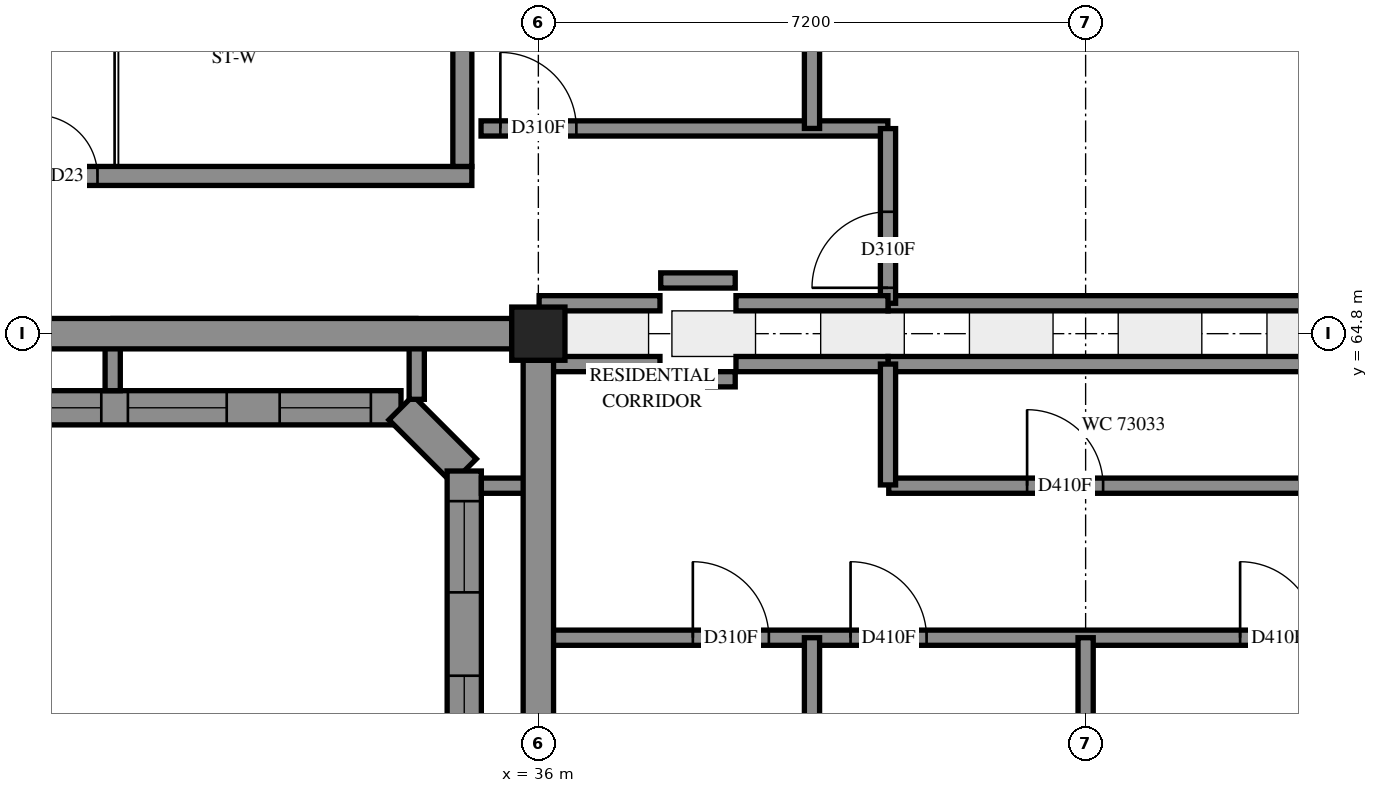
"""IFC4 building model, lengths in metres.
Left out: names, types, materials, properties, quantities, classifications, styles, units other than length and angle.
Written with IfcOpenShell. Run it as: python <this file> out.ifc"""

import sys

from ifc_helpers import new_model, si_unit, direction, frame, frame_2d, origin, origin_2d, place, context, subcontext, project, spatial, polyline, rectangle, outline, extrude, element, fill, save


model = new_model("IFC4")
c1 = context("Model", 3, precision=1e-05, world=origin(), true_north=direction((0.0, 1.0)))
c2 = subcontext(c1, "Body", "Model", "MODEL_VIEW")
j1 = project(units=[si_unit("LENGTHUNIT", "METRE"), si_unit("PLANEANGLEUNIT", "RADIAN")], contexts=[c1])
p1 = place(None, origin())
s1 = spatial("IfcSite", under=j1, at=p1, CompositionType="ELEMENT")
p2 = place(p1, origin())
s2 = spatial("IfcBuilding", under=s1, at=p2, CompositionType="ELEMENT")
p3 = place(p2, frame((0.0, 0.0, 267.6)))
s3 = spatial("IfcBuildingStorey", under=s2, at=p3, CompositionType="ELEMENT", Elevation=267.6)
p4 = place(p3, frame((36.0, 64.8, 0.0), z_axis=(0.0, 0.0, 1.0), x_axis=(1.0, 0.0, 0.0)))
e1 = element("IfcColumn", 1, at=p4, inside=s3, PredefinedType="COLUMN", context=c2, shape_type="SweptSolid", body=[
    extrude(rectangle(XDim=0.7, YDim=0.7, at=origin_2d()), origin(), (0.0, 0.0, 1.0), 3.1),
])
p5 = place(p3, frame((26.713, 63.825, 0.0), z_axis=(0.0, 0.0, 1.0), x_axis=(1.0, 0.0, 0.0)))
e2 = element("IfcWall", 2, at=p5, inside=s3, PredefinedType="SOLIDWALL", context=c2, shape_type="SweptSolid", body=[
    extrude(outline(polyline([(-0.225, -0.225), (7.387, -0.225), (7.573, 0.225), (0.225, 0.225), (-0.225, -0.225)])), origin(), (0.0, 0.0, 1.0), 3.1),
])
p6 = place(p5, frame((0.656, 0.0, 0.45)))
e3 = element("IfcOpeningElement", 3, at=p6, cuts=e2, PredefinedType="OPENING", context=c2, shape_type="SweptSolid", body=[
    extrude(rectangle(XDim=1.2, YDim=2.55, at=frame_2d((0.6, 1.275))), frame((0.0, 0.235, 0.0), z_axis=(0.0, -1.0, 0.0), x_axis=(1.0, 0.0, 0.0)), (0.0, 0.0, 1.0), 0.47),
])
p7 = place(p5, frame((5.884, 0.0, 0.45)))
e4 = element("IfcOpeningElement", 4, at=p7, cuts=e2, PredefinedType="OPENING", context=c2, shape_type="SweptSolid", body=[
    extrude(rectangle(XDim=1.2, YDim=2.55, at=frame_2d((0.6, 1.275))), frame((0.0, 0.235, 0.0), z_axis=(0.0, -1.0, 0.0), x_axis=(1.0, 0.0, 0.0)), (0.0, 0.0, 1.0), 0.47),
])
p8 = place(p5, frame((2.537, 0.0, 0.45)))
e5 = element("IfcOpeningElement", 5, at=p8, cuts=e2, PredefinedType="OPENING", context=c2, shape_type="SweptSolid", body=[
    extrude(rectangle(XDim=1.0, YDim=2.5, at=frame_2d((0.5, 1.25))), frame((0.0, 0.235, 0.0), z_axis=(0.0, -1.0, 0.0), x_axis=(1.0, 0.0, 0.0)), (0.0, 0.0, 1.0), 0.47),
])
p9 = place(p5, frame((3.887, 0.0, 0.45)))
e6 = element("IfcOpeningElement", 6, at=p9, cuts=e2, PredefinedType="OPENING", context=c2, shape_type="SweptSolid", body=[
    extrude(rectangle(XDim=1.3, YDim=2.5, at=frame_2d((0.65, 1.25))), frame((0.0, 0.235, 0.0), z_axis=(0.0, -1.0, 0.0), x_axis=(1.0, 0.0, 0.0)), (0.0, 0.0, 1.0), 0.47),
])
p10 = place(p3, frame((34.193, 63.825, 0.0), z_axis=(0.0, 0.0, 1.0), x_axis=(0.7071067812, -0.7071067812, 0.0)))
e7 = element("IfcWall", 7, at=p10, inside=s3, PredefinedType="SOLIDWALL", context=c2, shape_type="SweptSolid", body=[
    extrude(outline(polyline([(0.093, -0.225), (1.083, -0.225), (1.27, 0.225), (-0.093, 0.225), (0.093, -0.225)])), origin(), (0.0, 0.0, 1.0), 3.1),
])
p11 = place(p3, frame((35.025, 62.993, 0.0), z_axis=(0.0, 0.0, 1.0), x_axis=(0.0, -1.0, 0.0)))
e8 = element("IfcWall", 8, at=p11, inside=s3, PredefinedType="SOLIDWALL", context=c2, shape_type="SweptSolid", body=[
    extrude(outline(polyline([(0.093, -0.225), (6.593, -0.225), (6.143, 0.225), (-0.093, 0.225), (0.093, -0.225)])), origin(), (0.0, 0.0, 1.0), 3.1),
])
p12 = place(p11, frame((0.397, 0.0, 0.45)))
e9 = element("IfcOpeningElement", 9, at=p12, cuts=e8, PredefinedType="OPENING", context=c2, shape_type="SweptSolid", body=[
    extrude(rectangle(XDim=1.2, YDim=2.55, at=frame_2d((0.6, 1.275))), frame((0.0, 0.235, 0.0), z_axis=(0.0, -1.0, 0.0), x_axis=(1.0, 0.0, 0.0)), (0.0, 0.0, 1.0), 0.47),
])
p13 = place(p11, frame((2.693, 0.0, 0.7)))
e10 = element("IfcOpeningElement", 10, at=p13, cuts=e8, PredefinedType="OPENING", context=c2, shape_type="SweptSolid", body=[
    extrude(rectangle(XDim=1.8, YDim=2.3, at=frame_2d((0.9, 1.15))), frame((0.0, 0.235, 0.0), z_axis=(0.0, -1.0, 0.0), x_axis=(1.0, 0.0, 0.0)), (0.0, 0.0, 1.0), 0.47),
])
p14 = place(p3, frame((28.875, 66.875, -0.3), z_axis=(0.0, 0.0, 1.0), x_axis=(1.0, 0.0, 0.0)))
e11 = element("IfcWall", 11, at=p14, inside=s3, PredefinedType="SOLIDWALL", context=c2, shape_type="SweptSolid", body=[
    extrude(rectangle(XDim=6.25, YDim=0.25, at=frame_2d((3.125, 0.0))), origin(), (0.0, 0.0, 1.0), 3.4),
])
p15 = place(p14, frame((0.525, 0.0, 0.3)))
e12 = element("IfcOpeningElement", 12, at=p15, cuts=e11, PredefinedType="OPENING", context=c2, shape_type="SweptSolid", body=[
    extrude(rectangle(XDim=0.8, YDim=2.1, at=frame_2d((0.4, 1.05))), frame((0.0, 0.135, 0.0), z_axis=(0.0, -1.0, 0.0), x_axis=(1.0, 0.0, 0.0)), (0.0, 0.0, 1.0), 0.27),
])
p16 = place(p3, frame((35.0, 67.0, -0.3), z_axis=(0.0, 0.0, 1.0), x_axis=(0.0, 1.0, 0.0)))
e13 = element("IfcWall", 13, at=p16, inside=s3, PredefinedType="SOLIDWALL", context=c2, shape_type="SweptSolid", body=[
    extrude(rectangle(XDim=2.85, YDim=0.25, at=frame_2d((1.425, 0.0))), origin(), (0.0, 0.0, 1.0), 3.4),
])
p17 = place(p3, frame((36.0, 60.8, 0.0), z_axis=(0.0, 0.0, 1.0), x_axis=(1.0, 0.0, 0.0)))
e14 = element("IfcWall", 14, at=p17, inside=s3, PredefinedType="PARTITIONING", context=c2, shape_type="SweptSolid", body=[
    extrude(rectangle(XDim=17.0, YDim=0.2, at=frame_2d((8.5, 0.0))), origin(), (0.0, 0.0, 1.0), 3.1),
])
p18 = place(p17, frame((2.033, 0.0, 0.0)))
e15 = element("IfcOpeningElement", 15, at=p18, cuts=e14, PredefinedType="OPENING", context=c2, shape_type="SweptSolid", body=[
    extrude(rectangle(XDim=1.0, YDim=2.1, at=frame_2d((0.5, 1.05))), frame((0.0, 0.11, 0.0), z_axis=(0.0, -1.0, 0.0), x_axis=(1.0, 0.0, 0.0)), (0.0, 0.0, 1.0), 0.22),
])
p19 = place(p17, frame((4.107, 0.0, 0.0)))
e16 = element("IfcOpeningElement", 16, at=p19, cuts=e14, PredefinedType="OPENING", context=c2, shape_type="SweptSolid", body=[
    extrude(rectangle(XDim=1.0, YDim=2.1, at=frame_2d((0.5, 1.05))), frame((0.0, 0.11, 0.0), z_axis=(0.0, -1.0, 0.0), x_axis=(1.0, 0.0, 0.0)), (0.0, 0.0, 1.0), 0.22),
])
p20 = place(p17, frame((9.232, 0.0, 0.0)))
e17 = element("IfcOpeningElement", 17, at=p20, cuts=e14, PredefinedType="OPENING", context=c2, shape_type="SweptSolid", body=[
    extrude(rectangle(XDim=1.0, YDim=2.1, at=frame_2d((0.5, 1.05))), frame((0.0, 0.11, 0.0), z_axis=(0.0, -1.0, 0.0), x_axis=(1.0, 0.0, 0.0)), (0.0, 0.0, 1.0), 0.22),
])
p21 = place(p17, frame((11.307, 0.0, 0.0)))
e18 = element("IfcOpeningElement", 18, at=p21, cuts=e14, PredefinedType="OPENING", context=c2, shape_type="SweptSolid", body=[
    extrude(rectangle(XDim=1.0, YDim=2.1, at=frame_2d((0.5, 1.05))), frame((0.0, 0.11, 0.0), z_axis=(0.0, -1.0, 0.0), x_axis=(1.0, 0.0, 0.0)), (0.0, 0.0, 1.0), 0.22),
])
p22 = place(p17, frame((15.874, 0.0, 0.0)))
e19 = element("IfcOpeningElement", 19, at=p22, cuts=e14, PredefinedType="OPENING", context=c2, shape_type="SweptSolid", body=[
    extrude(rectangle(XDim=1.0, YDim=2.1, at=frame_2d((0.5, 1.05))), frame((0.0, 0.11, 0.0), z_axis=(0.0, -1.0, 0.0), x_axis=(1.0, 0.0, 0.0)), (0.0, 0.0, 1.0), 0.22),
])
p23 = place(p3, frame((40.61, 62.8, 0.0), z_axis=(0.0, 0.0, 1.0), x_axis=(1.0, 0.0, 0.0)))
e20 = element("IfcWall", 20, at=p23, inside=s3, PredefinedType="PARTITIONING", context=c2, shape_type="SweptSolid", body=[
    extrude(rectangle(XDim=14.59, YDim=0.2, at=frame_2d((7.295, 0.0))), origin(), (0.0, 0.0, 1.0), 3.1),
])
p24 = place(p23, frame((1.82, 0.0, 0.0)))
e21 = element("IfcOpeningElement", 21, at=p24, cuts=e20, PredefinedType="OPENING", context=c2, shape_type="SweptSolid", body=[
    extrude(rectangle(XDim=1.0, YDim=2.1, at=frame_2d((0.5, 1.05))), frame((0.0, 0.11, 0.0), z_axis=(0.0, -1.0, 0.0), x_axis=(1.0, 0.0, 0.0)), (0.0, 0.0, 1.0), 0.22),
])
p25 = place(p23, frame((6.758, 0.0, 0.0)))
e22 = element("IfcOpeningElement", 22, at=p25, cuts=e20, PredefinedType="OPENING", context=c2, shape_type="SweptSolid", body=[
    extrude(rectangle(XDim=1.0, YDim=2.1, at=frame_2d((0.5, 1.05))), frame((0.0, 0.11, 0.0), z_axis=(0.0, -1.0, 0.0), x_axis=(1.0, 0.0, 0.0)), (0.0, 0.0, 1.0), 0.22),
])
p26 = place(p23, frame((10.005, 0.0, 0.0)))
e23 = element("IfcOpeningElement", 23, at=p26, cuts=e20, PredefinedType="OPENING", context=c2, shape_type="SweptSolid", body=[
    extrude(rectangle(XDim=1.0, YDim=2.1, at=frame_2d((0.5, 1.05))), frame((0.0, 0.11, 0.0), z_axis=(0.0, -1.0, 0.0), x_axis=(1.0, 0.0, 0.0)), (0.0, 0.0, 1.0), 0.22),
])
for number, where, z_axis, x_axis in (
    (24, (40.6, 64.4, 0.0), (0.0, 0.0, 1.0), (1.0, 0.0, 0.0)),
    (25, (40.6, 65.2, 0.0), (0.0, 0.0, 1.0), (1.0, 0.0, 0.0)),
):
    element("IfcWall", number, at=place(p3, frame(where, z_axis=z_axis, x_axis=x_axis)), inside=s3, PredefinedType="PARTITIONING", context=c2, shape_type="SweptSolid", body=[
        extrude(rectangle(XDim=9.8, YDim=0.2, at=frame_2d((4.9, 0.0))), origin(), (0.0, 0.0, 1.0), 3.1),
    ])
p27 = place(p3, frame((35.246, 67.5, 0.0), z_axis=(0.0, 0.0, 1.0), x_axis=(1.0, 0.0, 0.0)))
e26 = element("IfcWall", 26, at=p27, inside=s3, PredefinedType="PARTITIONING", context=c2, shape_type="SweptSolid", body=[
    extrude(rectangle(XDim=5.352, YDim=0.2, at=frame_2d((2.676, 0.0))), origin(), (0.0, 0.0, 1.0), 3.1),
])
p28 = place(p27, frame((0.254, 0.0, 0.0)))
e27 = element("IfcOpeningElement", 27, at=p28, cuts=e26, PredefinedType="OPENING", context=c2, shape_type="SweptSolid", body=[
    extrude(rectangle(XDim=1.0, YDim=2.1, at=frame_2d((0.5, 1.05))), frame((0.0, 0.11, 0.0), z_axis=(0.0, -1.0, 0.0), x_axis=(1.0, 0.0, 0.0)), (0.0, 0.0, 1.0), 0.22),
])
p29 = place(p3, frame((39.6, 67.5, 0.0), z_axis=(0.0, 0.0, 1.0), x_axis=(0.0, 1.0, 0.0)))
e28 = element("IfcWall", 28, at=p29, inside=s3, PredefinedType="PARTITIONING", context=c2, shape_type="SweptSolid", body=[
    extrude(rectangle(XDim=4.1, YDim=0.2, at=frame_2d((2.05, 0.0))), origin(), (0.0, 0.0, 1.0), 3.1),
])
p30 = place(p3, frame((30.402, 64.9, 0.0), z_axis=(0.0, 0.0, 1.0), x_axis=(1.0, 0.0, 0.0)))
e29 = element("IfcWall", 29, at=p30, inside=s3, PredefinedType="PARTITIONING", context=c2, shape_type="SweptSolid", body=[
    extrude(rectangle(XDim=3.988, YDim=0.2, at=frame_2d((1.994, 0.0))), origin(), (0.0, 0.0, 1.0), 2.6),
])
p31 = place(p3, frame((36.0, 58.0, 0.0), z_axis=(0.0, 0.0, 1.0), x_axis=(0.0, 1.0, 0.0)))
e30 = element("IfcWall", 30, at=p31, inside=s3, PredefinedType="PARTITIONING", context=c2, shape_type="SweptSolid", body=[
    extrude(rectangle(XDim=2.8, YDim=0.2, at=frame_2d((1.4, 0.0))), origin(), (0.0, 0.0, 1.0), 2.6),
])
for number, where, z_axis, x_axis in (
    (31, (39.6, 58.0, 0.0), (0.0, 0.0, 1.0), (0.0, 1.0, 0.0)),
    (32, (43.2, 58.0, 0.0), (0.0, 0.0, 1.0), (0.0, 1.0, 0.0)),
):
    element("IfcWall", number, at=place(p3, frame(where, z_axis=z_axis, x_axis=x_axis)), inside=s3, PredefinedType="PARTITIONING", context=c2, shape_type="SweptSolid", body=[
        extrude(rectangle(XDim=2.8, YDim=0.2, at=frame_2d((1.4, 0.0))), origin(), (0.0, 0.0, 1.0), 3.1),
    ])
p32 = place(p3, frame((40.6, 65.2, 0.0), z_axis=(0.0, 0.0, 1.0), x_axis=(0.0, 1.0, 0.0)))
e33 = element("IfcWall", 33, at=p32, inside=s3, PredefinedType="PARTITIONING", context=c2, shape_type="SweptSolid", body=[
    extrude(rectangle(XDim=2.298, YDim=0.2, at=frame_2d((1.149, 0.0))), origin(), (0.0, 0.0, 1.0), 3.1),
])
p33 = place(p32, frame((0.203, 0.0, 0.0)))
e34 = element("IfcOpeningElement", 34, at=p33, cuts=e33, PredefinedType="OPENING", context=c2, shape_type="SweptSolid", body=[
    extrude(rectangle(XDim=1.0, YDim=2.1, at=frame_2d((0.5, 1.05))), frame((0.0, 0.11, 0.0), z_axis=(0.0, -1.0, 0.0), x_axis=(1.0, 0.0, 0.0)), (0.0, 0.0, 1.0), 0.22),
])
for number, where, z_axis, x_axis in (
    (35, (38.6, 64.4, 0.0), (0.0, 0.0, 1.0), (1.0, 0.0, 0.0)),
    (36, (38.6, 65.2, 0.0), (0.0, 0.0, 1.0), (1.0, 0.0, 0.0)),
):
    element("IfcWall", number, at=place(p3, frame(where, z_axis=z_axis, x_axis=x_axis)), inside=s3, PredefinedType="PARTITIONING", context=c2, shape_type="SweptSolid", body=[
        extrude(rectangle(XDim=2.0, YDim=0.2, at=frame_2d((1.0, 0.0))), origin(), (0.0, 0.0, 1.0), 3.1),
    ])
p34 = place(p3, frame((36.0, 60.8, 0.0), z_axis=(0.0, 0.0, 1.0), x_axis=(0.0, 1.0, 0.0)))
e37 = element("IfcWall", 37, at=p34, inside=s3, PredefinedType="PARTITIONING", context=c2, shape_type="SweptSolid", body=[
    extrude(rectangle(XDim=1.988, YDim=0.2, at=frame_2d((0.994, 0.0))), origin(), (0.0, 0.0, 1.0), 2.6),
])
for number, where, z_axis, x_axis in (
    (38, (36.01, 64.4, 0.0), (0.0, 0.0, 1.0), (1.0, 0.0, 0.0)),
    (39, (36.01, 65.2, 0.0), (0.0, 0.0, 1.0), (1.0, 0.0, 0.0)),
    (40, (40.6, 62.81, 0.0), (0.0, 0.0, 1.0), (0.0, 1.0, 0.0)),
):
    element("IfcWall", number, at=place(p3, frame(where, z_axis=z_axis, x_axis=x_axis)), inside=s3, PredefinedType="PARTITIONING", context=c2, shape_type="SweptSolid", body=[
        extrude(rectangle(XDim=1.59, YDim=0.2, at=frame_2d((0.795, 0.0))), origin(), (0.0, 0.0, 1.0), 3.1),
    ])
for number, where, z_axis, x_axis in (
    (41, (37.61, 64.2, 0.0), (0.0, 0.0, 1.0), (1.0, 0.0, 0.0)),
    (42, (37.61, 65.5, 0.0), (0.0, 0.0, 1.0), (1.0, 0.0, 0.0)),
):
    element("IfcWall", number, at=place(p3, frame(where, z_axis=z_axis, x_axis=x_axis)), inside=s3, PredefinedType="PARTITIONING", context=c2, shape_type="SweptSolid", body=[
        extrude(rectangle(XDim=0.98, YDim=0.2, at=frame_2d((0.49, 0.0))), origin(), (0.0, 0.0, 1.0), 3.1),
    ])
p35 = place(p3, frame((34.4, 63.936, 0.0), z_axis=(0.0, 0.0, 1.0), x_axis=(0.0, 1.0, 0.0)))
e43 = element("IfcWall", 43, at=p35, inside=s3, PredefinedType="PARTITIONING", context=c2, shape_type="SweptSolid", body=[
    extrude(rectangle(XDim=0.954, YDim=0.2, at=frame_2d((0.477, 0.0))), origin(), (0.0, 0.0, 1.0), 3.1),
])
p36 = place(p3, frame((30.4, 64.05, 0.0), z_axis=(0.0, 0.0, 1.0), x_axis=(0.0, 1.0, 0.0)))
e44 = element("IfcWall", 44, at=p36, inside=s3, PredefinedType="PARTITIONING", context=c2, shape_type="SweptSolid", body=[
    extrude(rectangle(XDim=0.85, YDim=0.2, at=frame_2d((0.425, 0.0))), origin(), (0.0, 0.0, 1.0), 3.1),
])
p37 = place(p3, frame((35.25, 62.8, 0.0), z_axis=(0.0, 0.0, 1.0), x_axis=(1.0, 0.0, 0.0)))
e45 = element("IfcWall", 45, at=p37, inside=s3, PredefinedType="PARTITIONING", context=c2, shape_type="SweptSolid", body=[
    extrude(rectangle(XDim=0.74, YDim=0.2, at=frame_2d((0.37, 0.0))), origin(), (0.0, 0.0, 1.0), 3.1),
])
p38 = place(p7, origin())
e46 = element("IfcWindow", 46, at=p38, inside=s3, PartitioningType="SINGLE_PANEL", PredefinedType="WINDOW", context=c2, shape_type="SweptSolid", body=[
    extrude(rectangle(XDim=1.2, YDim=2.55, at=frame_2d((0.6, 1.275))), frame((0.0, 0.205, 0.0), z_axis=(0.0, -1.0, 0.0), x_axis=(1.0, 0.0, 0.0)), (0.0, 0.0, 1.0), 0.06),
])
fill(e4, e46)
p39 = place(p12, origin())
e47 = element("IfcWindow", 47, at=p39, inside=s3, PartitioningType="SINGLE_PANEL", PredefinedType="WINDOW", context=c2, shape_type="SweptSolid", body=[
    extrude(rectangle(XDim=1.2, YDim=2.55, at=frame_2d((0.6, 1.275))), frame((0.0, 0.205, 0.0), z_axis=(0.0, -1.0, 0.0), x_axis=(1.0, 0.0, 0.0)), (0.0, 0.0, 1.0), 0.06),
])
fill(e9, e47)
p40 = place(p15, origin())
e48 = element("IfcDoor", 48, at=p40, inside=s3, OperationType="SINGLE_SWING_LEFT", PredefinedType="DOOR", context=c2, shape_type="SweptSolid", body=[
    extrude(rectangle(XDim=0.8, YDim=2.1, at=frame_2d((0.4, 1.05))), frame((0.0, 0.025, 0.0), z_axis=(0.0, -1.0, 0.0), x_axis=(1.0, 0.0, 0.0)), (0.0, 0.0, 1.0), 0.05),
])
fill(e12, e48)
p41 = place(p18, origin())
e49 = element("IfcDoor", 49, at=p41, inside=s3, OperationType="SINGLE_SWING_LEFT", PredefinedType="DOOR", context=c2, shape_type="SweptSolid", body=[
    extrude(rectangle(XDim=1.0, YDim=2.1, at=frame_2d((0.5, 1.05))), frame((0.0, 0.025, 0.0), z_axis=(0.0, -1.0, 0.0), x_axis=(1.0, 0.0, 0.0)), (0.0, 0.0, 1.0), 0.05),
])
fill(e15, e49)
p42 = place(p19, origin())
e50 = element("IfcDoor", 50, at=p42, inside=s3, OperationType="SINGLE_SWING_RIGHT", PredefinedType="DOOR", context=c2, shape_type="SweptSolid", body=[
    extrude(rectangle(XDim=1.0, YDim=2.1, at=frame_2d((0.5, 1.05))), frame((0.0, 0.025, 0.0), z_axis=(0.0, -1.0, 0.0), x_axis=(1.0, 0.0, 0.0)), (0.0, 0.0, 1.0), 0.05),
])
fill(e16, e50)
p43 = place(p20, origin())
e51 = element("IfcDoor", 51, at=p43, inside=s3, OperationType="SINGLE_SWING_LEFT", PredefinedType="DOOR", context=c2, shape_type="SweptSolid", body=[
    extrude(rectangle(XDim=1.0, YDim=2.1, at=frame_2d((0.5, 1.05))), frame((0.0, 0.025, 0.0), z_axis=(0.0, -1.0, 0.0), x_axis=(1.0, 0.0, 0.0)), (0.0, 0.0, 1.0), 0.05),
])
fill(e17, e51)
p44 = place(p28, origin())
e52 = element("IfcDoor", 52, at=p44, inside=s3, OperationType="SINGLE_SWING_LEFT", PredefinedType="DOOR", context=c2, shape_type="SweptSolid", body=[
    extrude(rectangle(XDim=1.0, YDim=2.1, at=frame_2d((0.5, 1.05))), frame((0.0, 0.025, 0.0), z_axis=(0.0, -1.0, 0.0), x_axis=(1.0, 0.0, 0.0)), (0.0, 0.0, 1.0), 0.05),
])
fill(e27, e52)
p45 = place(p33, origin())
e53 = element("IfcDoor", 53, at=p45, inside=s3, OperationType="SINGLE_SWING_LEFT", PredefinedType="DOOR", context=c2, shape_type="SweptSolid", body=[
    extrude(rectangle(XDim=1.0, YDim=2.1, at=frame_2d((0.5, 1.05))), frame((0.0, 0.025, 0.0), z_axis=(0.0, -1.0, 0.0), x_axis=(1.0, 0.0, 0.0)), (0.0, 0.0, 1.0), 0.05),
])
fill(e34, e53)
p46 = place(p24, origin())
e54 = element("IfcDoor", 54, at=p46, inside=s3, OperationType="SINGLE_SWING_LEFT", PredefinedType="DOOR", context=c2, shape_type="SweptSolid", body=[
    extrude(rectangle(XDim=1.0, YDim=2.1, at=frame_2d((0.5, 1.05))), frame((0.0, 0.025, 0.0), z_axis=(0.0, -1.0, 0.0), x_axis=(1.0, 0.0, 0.0)), (0.0, 0.0, 1.0), 0.05),
])
fill(e21, e54)
p47 = place(p8, origin())
e55 = element("IfcWindow", 55, at=p47, inside=s3, PartitioningType="SINGLE_PANEL", PredefinedType="WINDOW", context=c2, shape_type="SweptSolid", body=[
    extrude(rectangle(XDim=1.0, YDim=2.5, at=frame_2d((0.5, 1.25))), frame((0.0, 0.205, 0.0), z_axis=(0.0, -1.0, 0.0), x_axis=(1.0, 0.0, 0.0)), (0.0, 0.0, 1.0), 0.06),
])
fill(e5, e55)
p48 = place(p9, origin())
e56 = element("IfcWindow", 56, at=p48, inside=s3, PartitioningType="SINGLE_PANEL", PredefinedType="WINDOW", context=c2, shape_type="SweptSolid", body=[
    extrude(rectangle(XDim=1.3, YDim=2.5, at=frame_2d((0.65, 1.25))), frame((0.0, 0.205, 0.0), z_axis=(0.0, -1.0, 0.0), x_axis=(1.0, 0.0, 0.0)), (0.0, 0.0, 1.0), 0.06),
])
fill(e6, e56)
p49 = place(p13, origin())
e57 = element("IfcWindow", 57, at=p49, inside=s3, PartitioningType="SINGLE_PANEL", PredefinedType="WINDOW", context=c2, shape_type="SweptSolid", body=[
    extrude(rectangle(XDim=1.8, YDim=2.3, at=frame_2d((0.9, 1.15))), frame((0.0, 0.205, 0.0), z_axis=(0.0, -1.0, 0.0), x_axis=(1.0, 0.0, 0.0)), (0.0, 0.0, 1.0), 0.06),
])
fill(e10, e57)
save(model, sys.argv[1])
